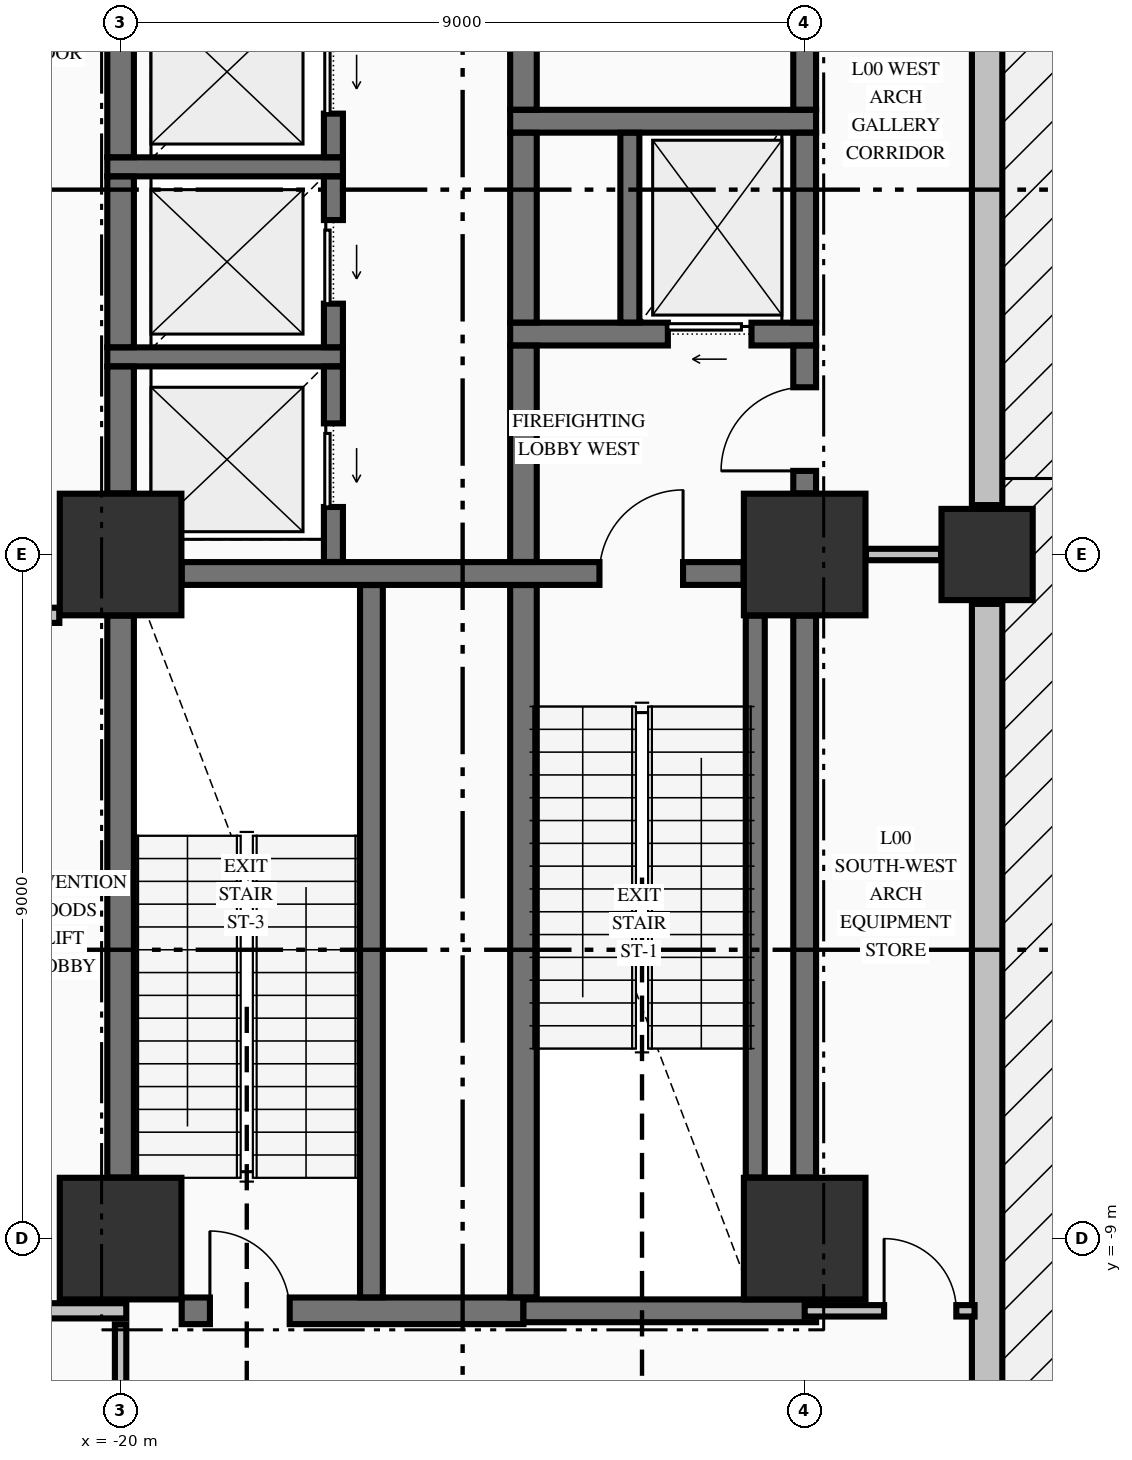
"""IFC4 building model, lengths in metres.
Left out: names, types, materials, properties, quantities, classifications, styles, units other than length and angle.
Written with IfcOpenShell. Run it as: python <this file> out.ifc"""

import sys

from ifc_helpers import new_model, si_unit, direction, frame, frame_2d, origin, origin_2d, place, context, subcontext, project, spatial, rectangle, extrude, element, fill, save


model = new_model("IFC4")
c1 = context("Model", 3, precision=1e-05, world=origin(), true_north=direction((0.0, 1.0)))
c2 = subcontext(c1, "Body", "Model", "MODEL_VIEW")
j1 = project(units=[si_unit("LENGTHUNIT", "METRE"), si_unit("PLANEANGLEUNIT", "RADIAN")], contexts=[c1])
p1 = place(None, origin())
s1 = spatial("IfcSite", under=j1, at=p1, CompositionType="ELEMENT")
p2 = place(p1, origin())
s2 = spatial("IfcBuilding", under=s1, at=p2, CompositionType="ELEMENT")
p3 = place(p2, origin())
s3 = spatial("IfcBuildingStorey", under=s2, at=p3, CompositionType="ELEMENT", Elevation=0.0)
for number, where, z_axis, x_axis in (
    (1, (-20.0, -9.0, 0.0), (0.0, 0.0, 1.0), (1.0, 0.0, 0.0)),
    (2, (-20.0, 0.0, 0.0), (0.0, 0.0, 1.0), (1.0, 0.0, 0.0)),
    (3, (-11.0, -9.0, 0.0), (0.0, 0.0, 1.0), (1.0, 0.0, 0.0)),
    (4, (-11.0, 0.0, 0.0), (0.0, 0.0, 1.0), (1.0, 0.0, 0.0)),
):
    element("IfcColumn", number, at=place(p3, frame(where, z_axis=z_axis, x_axis=x_axis)), inside=s3, PredefinedType="COLUMN", context=c2, shape_type="SweptSolid", body=[
        extrude(rectangle(XDim=1.6, YDim=1.6, at=origin_2d()), origin(), (0.0, 0.0, 1.0), 5.09),
    ])
p4 = place(p3, frame((-8.6, 0.0, 0.0), z_axis=(0.0, 0.0, 1.0), x_axis=(1.0, 0.0, 0.0)))
e5 = element("IfcColumn", 5, at=p4, inside=s3, PredefinedType="COLUMN", context=c2, shape_type="SweptSolid", body=[
    extrude(rectangle(XDim=1.2, YDim=1.2, at=origin_2d()), origin(), (0.0, 0.0, 1.0), 5.09),
])
p5 = place(p3, frame((-8.6, -25.35, 0.0), z_axis=(0.0, 0.0, 1.0), x_axis=(0.0, 1.0, 0.0)))
e6 = element("IfcWall", 6, at=p5, inside=s3, PredefinedType="STANDARD", context=c2, shape_type="SweptSolid", body=[
    extrude(rectangle(XDim=24.7, YDim=0.4, at=frame_2d((12.35, 0.0))), origin(), (0.0, 0.0, 1.0), 4.132),
])
p6 = place(p5, frame((10.5, 0.0, 0.0)))
e7 = element("IfcOpeningElement", 7, at=p6, cuts=e6, PredefinedType="OPENING", context=c2, shape_type="SweptSolid", body=[
    extrude(rectangle(XDim=2.4, YDim=2.6, at=frame_2d((1.2, 1.3))), frame((0.0, 0.21, 0.0), z_axis=(0.0, -1.0, 0.0), x_axis=(1.0, 0.0, 0.0)), (0.0, 0.0, 1.0), 0.42),
])
p7 = place(p3, frame((-8.6, 0.65, 0.0), z_axis=(0.0, 0.0, 1.0), x_axis=(0.0, 1.0, 0.0)))
e8 = element("IfcWall", 8, at=p7, inside=s3, PredefinedType="STANDARD", context=c2, shape_type="SweptSolid", body=[
    extrude(rectangle(XDim=14.7, YDim=0.4, at=frame_2d((7.35, 0.0))), origin(), (0.0, 0.0, 1.0), 4.132),
])
p8 = place(p3, frame((-19.196, -9.95, 0.0), z_axis=(0.0, 0.0, 1.0), x_axis=(1.0, 0.0, 0.0)))
e9 = element("IfcWall", 9, at=p8, inside=s3, PredefinedType="SHEAR", context=c2, shape_type="SweptSolid", body=[
    extrude(rectangle(XDim=4.496, YDim=0.35, at=frame_2d((2.248, 0.0))), origin(), (0.0, 0.0, 1.0), 5.09),
])
p9 = place(p8, frame((0.371, 0.0, 0.0)))
e10 = element("IfcOpeningElement", 10, at=p9, cuts=e9, PredefinedType="OPENING", context=c2, shape_type="SweptSolid", body=[
    extrude(rectangle(XDim=1.05, YDim=2.15, at=frame_2d((0.525, 1.075))), frame((0.0, 0.185, 0.0), z_axis=(0.0, -1.0, 0.0), x_axis=(1.0, 0.0, 0.0)), (0.0, 0.0, 1.0), 0.37),
])
p10 = place(p3, frame((-14.7, -9.95, 0.0), z_axis=(0.0, 0.0, 1.0), x_axis=(1.0, 0.0, 0.0)))
e11 = element("IfcWall", 11, at=p10, inside=s3, PredefinedType="SHEAR", context=c2, shape_type="SweptSolid", body=[
    extrude(rectangle(XDim=3.85, YDim=0.3, at=frame_2d((1.925, 0.0))), origin(), (0.0, 0.0, 1.0), 5.09),
])
p11 = place(p3, frame((-19.196, -0.25, 0.0), z_axis=(0.0, 0.0, 1.0), x_axis=(1.0, 0.0, 0.0)))
e12 = element("IfcWall", 12, at=p11, inside=s3, PredefinedType="SHEAR", context=c2, shape_type="SweptSolid", body=[
    extrude(rectangle(XDim=7.392, YDim=0.3, at=frame_2d((3.696, 0.0))), origin(), (0.0, 0.0, 1.0), 5.09),
])
p12 = place(p11, frame((5.496, 0.0, 0.0)))
e13 = element("IfcOpeningElement", 13, at=p12, cuts=e12, PredefinedType="OPENING", context=c2, shape_type="SweptSolid", body=[
    extrude(rectangle(XDim=1.1, YDim=2.15, at=frame_2d((0.55, 1.075))), frame((0.0, 0.16, 0.0), z_axis=(0.0, -1.0, 0.0), x_axis=(1.0, 0.0, 0.0)), (0.0, 0.0, 1.0), 0.32),
])
p13 = place(p3, frame((-20.175, 2.6, 0.0), z_axis=(0.0, 0.0, 1.0), x_axis=(1.0, 0.0, 0.0)))
e14 = element("IfcWall", 14, at=p13, inside=s3, PredefinedType="SOLIDWALL", context=c2, shape_type="SweptSolid", body=[
    extrude(rectangle(XDim=3.1, YDim=0.25, at=frame_2d((1.55, 0.0))), origin(), (0.0, 0.0, 1.0), 5.09),
])
p14 = place(p3, frame((-14.875, 2.9, 0.0), z_axis=(0.0, 0.0, 1.0), x_axis=(1.0, 0.0, 0.0)))
e15 = element("IfcWall", 15, at=p14, inside=s3, PredefinedType="SHEAR", context=c2, shape_type="SweptSolid", body=[
    extrude(rectangle(XDim=4.025, YDim=0.3, at=frame_2d((2.012, 0.0))), origin(), (0.0, 0.0, 1.0), 5.09),
])
p15 = place(p14, frame((2.075, 0.0, 0.0)))
e16 = element("IfcOpeningElement", 16, at=p15, cuts=e15, PredefinedType="OPENING", context=c2, shape_type="SweptSolid", body=[
    extrude(rectangle(XDim=1.1, YDim=2.2, at=frame_2d((0.55, 1.1))), frame((0.0, 0.16, 0.0), z_axis=(0.0, -1.0, 0.0), x_axis=(1.0, 0.0, 0.0)), (0.0, 0.0, 1.0), 0.32),
])
p16 = place(p3, frame((-20.175, 5.1, 0.0), z_axis=(0.0, 0.0, 1.0), x_axis=(1.0, 0.0, 0.0)))
e17 = element("IfcWall", 17, at=p16, inside=s3, PredefinedType="SOLIDWALL", context=c2, shape_type="SweptSolid", body=[
    extrude(rectangle(XDim=3.1, YDim=0.25, at=frame_2d((1.55, 0.0))), origin(), (0.0, 0.0, 1.0), 5.09),
])
p17 = place(p3, frame((-14.875, 5.7, 0.0), z_axis=(0.0, 0.0, 1.0), x_axis=(1.0, 0.0, 0.0)))
e18 = element("IfcWall", 18, at=p17, inside=s3, PredefinedType="SHEAR", context=c2, shape_type="SweptSolid", body=[
    extrude(rectangle(XDim=4.025, YDim=0.3, at=frame_2d((2.012, 0.0))), origin(), (0.0, 0.0, 1.0), 5.09),
])
p18 = place(p3, frame((-22.5, -9.95, 0.0), z_axis=(0.0, 0.0, 1.0), x_axis=(1.0, 0.0, 0.0)))
e19 = element("IfcWall", 19, at=p18, inside=s3, PredefinedType="PARTITIONING", context=c2, shape_type="SweptSolid", body=[
    extrude(rectangle(XDim=2.575, YDim=0.2, at=frame_2d((1.288, 0.0))), origin(), (0.0, 0.0, 1.0), 5.09),
])
p19 = place(p18, frame((0.48, 0.0, 0.0)))
e20 = element("IfcOpeningElement", 20, at=p19, cuts=e19, PredefinedType="OPENING", context=c2, shape_type="SweptSolid", body=[
    extrude(rectangle(XDim=1.0, YDim=2.15, at=frame_2d((0.5, 1.075))), frame((0.0, 0.11, 0.0), z_axis=(0.0, -1.0, 0.0), x_axis=(1.0, 0.0, 0.0)), (0.0, 0.0, 1.0), 0.22),
])
p20 = place(p3, frame((-11.0, -9.95, 0.0), z_axis=(0.0, 0.0, 1.0), x_axis=(1.0, 0.0, 0.0)))
e21 = element("IfcWall", 21, at=p20, inside=s3, PredefinedType="PARTITIONING", context=c2, shape_type="SweptSolid", body=[
    extrude(rectangle(XDim=2.235, YDim=0.15, at=frame_2d((1.118, 0.0))), origin(), (0.0, 0.0, 1.0), 5.09),
])
p21 = place(p20, frame((1.045, 0.0, 0.0)))
e22 = element("IfcOpeningElement", 22, at=p21, cuts=e21, PredefinedType="OPENING", context=c2, shape_type="SweptSolid", body=[
    extrude(rectangle(XDim=0.95, YDim=2.15, at=frame_2d((0.475, 1.075))), frame((0.0, 0.085, 0.0), z_axis=(0.0, -1.0, 0.0), x_axis=(1.0, 0.0, 0.0)), (0.0, 0.0, 1.0), 0.17),
])
p22 = place(p3, frame((-22.475, -0.8, 0.0), z_axis=(0.0, 0.0, 1.0), x_axis=(1.0, 0.0, 0.0)))
e23 = element("IfcWall", 23, at=p22, inside=s3, PredefinedType="PARTITIONING", context=c2, shape_type="SweptSolid", body=[
    extrude(rectangle(XDim=1.669, YDim=0.2, at=frame_2d((0.834, 0.0))), origin(), (0.0, 0.0, 1.0), 5.09),
])
p23 = place(p22, frame((0.425, 0.0, 0.0)))
e24 = element("IfcOpeningElement", 24, at=p23, cuts=e23, PredefinedType="OPENING", context=c2, shape_type="SweptSolid", body=[
    extrude(rectangle(XDim=1.0, YDim=2.15, at=frame_2d((0.5, 1.075))), frame((0.0, 0.11, 0.0), z_axis=(0.0, -1.0, 0.0), x_axis=(1.0, 0.0, 0.0)), (0.0, 0.0, 1.0), 0.22),
])
p24 = place(p3, frame((-10.194, 0.0, 0.0), z_axis=(0.0, 0.0, 1.0), x_axis=(1.0, 0.0, 0.0)))
e25 = element("IfcWall", 25, at=p24, inside=s3, PredefinedType="PARTITIONING", context=c2, shape_type="SweptSolid", body=[
    extrude(rectangle(XDim=0.988, YDim=0.15, at=frame_2d((0.494, 0.0))), origin(), (0.0, 0.0, 1.0), 4.132),
])
p25 = place(p3, frame((-20.0, -8.196, 0.0), z_axis=(0.0, 0.0, 1.0), x_axis=(0.0, 1.0, 0.0)))
e26 = element("IfcWall", 26, at=p25, inside=s3, PredefinedType="SHEAR", context=c2, shape_type="SweptSolid", body=[
    extrude(rectangle(XDim=7.392, YDim=0.35, at=frame_2d((3.696, 0.0))), origin(), (0.0, 0.0, 1.0), 5.09),
])
p26 = place(p3, frame((-20.0, 0.804, 0.0), z_axis=(0.0, 0.0, 1.0), x_axis=(0.0, 1.0, 0.0)))
e27 = element("IfcWall", 27, at=p26, inside=s3, PredefinedType="SHEAR", context=c2, shape_type="SweptSolid", body=[
    extrude(rectangle(XDim=1.669, YDim=0.35, at=frame_2d((0.834, 0.0))), origin(), (0.0, 0.0, 1.0), 5.09),
])
for number, where, z_axis, x_axis in (
    (28, (-20.0, 2.727, 0.0), (0.0, 0.0, 1.0), (0.0, 1.0, 0.0)),
    (29, (-20.0, 5.227, 0.0), (0.0, 0.0, 1.0), (0.0, 1.0, 0.0)),
):
    element("IfcWall", number, at=place(p3, frame(where, z_axis=z_axis, x_axis=x_axis)), inside=s3, PredefinedType="SHEAR", context=c2, shape_type="SweptSolid", body=[
        extrude(rectangle(XDim=2.246, YDim=0.35, at=frame_2d((1.123, 0.0))), origin(), (0.0, 0.0, 1.0), 5.09),
    ])
p27 = place(p3, frame((-17.2, -0.098, 0.0), z_axis=(0.0, 0.0, 1.0), x_axis=(0.0, 1.0, 0.0)))
e30 = element("IfcWall", 30, at=p27, inside=s3, PredefinedType="SOLIDWALL", context=c2, shape_type="SweptSolid", body=[
    extrude(rectangle(XDim=2.571, YDim=0.25, at=frame_2d((1.285, 0.0))), origin(), (0.0, 0.0, 1.0), 5.09),
])
p28 = place(p27, frame((0.723, 0.0, 0.0)))
e31 = element("IfcOpeningElement", 31, at=p28, cuts=e30, PredefinedType="OPENING", context=c2, shape_type="SweptSolid", body=[
    extrude(rectangle(XDim=1.1, YDim=2.2, at=frame_2d((0.55, 1.1))), frame((0.0, 0.135, 0.0), z_axis=(0.0, -1.0, 0.0), x_axis=(1.0, 0.0, 0.0)), (0.0, 0.0, 1.0), 0.27),
])
p29 = place(p3, frame((-17.2, 2.727, 0.0), z_axis=(0.0, 0.0, 1.0), x_axis=(0.0, 1.0, 0.0)))
e32 = element("IfcWall", 32, at=p29, inside=s3, PredefinedType="SOLIDWALL", context=c2, shape_type="SweptSolid", body=[
    extrude(rectangle(XDim=2.246, YDim=0.25, at=frame_2d((1.123, 0.0))), origin(), (0.0, 0.0, 1.0), 5.09),
])
p30 = place(p29, frame((0.573, 0.0, 0.0)))
e33 = element("IfcOpeningElement", 33, at=p30, cuts=e32, PredefinedType="OPENING", context=c2, shape_type="SweptSolid", body=[
    extrude(rectangle(XDim=1.1, YDim=2.2, at=frame_2d((0.55, 1.1))), frame((0.0, 0.135, 0.0), z_axis=(0.0, -1.0, 0.0), x_axis=(1.0, 0.0, 0.0)), (0.0, 0.0, 1.0), 0.27),
])
p31 = place(p3, frame((-17.2, 5.227, 0.0), z_axis=(0.0, 0.0, 1.0), x_axis=(0.0, 1.0, 0.0)))
e34 = element("IfcWall", 34, at=p31, inside=s3, PredefinedType="SOLIDWALL", context=c2, shape_type="SweptSolid", body=[
    extrude(rectangle(XDim=2.246, YDim=0.25, at=frame_2d((1.123, 0.0))), origin(), (0.0, 0.0, 1.0), 5.09),
])
p32 = place(p31, frame((0.573, 0.0, 0.0)))
e35 = element("IfcOpeningElement", 35, at=p32, cuts=e34, PredefinedType="OPENING", context=c2, shape_type="SweptSolid", body=[
    extrude(rectangle(XDim=1.1, YDim=2.2, at=frame_2d((0.55, 1.1))), frame((0.0, 0.135, 0.0), z_axis=(0.0, -1.0, 0.0), x_axis=(1.0, 0.0, 0.0)), (0.0, 0.0, 1.0), 0.27),
])
p33 = place(p3, frame((-16.7, -9.773, 0.0), z_axis=(0.0, 0.0, 1.0), x_axis=(0.0, 1.0, 0.0)))
e36 = element("IfcWall", 36, at=p33, inside=s3, PredefinedType="SHEAR", context=c2, shape_type="SweptSolid", body=[
    extrude(rectangle(XDim=9.371, YDim=0.3, at=frame_2d((4.686, 0.0))), origin(), (0.0, 0.0, 1.0), 5.09),
])
p34 = place(p3, frame((-14.7, -9.773, 0.0), z_axis=(0.0, 0.0, 1.0), x_axis=(0.0, 1.0, 0.0)))
e37 = element("IfcWall", 37, at=p34, inside=s3, PredefinedType="SHEAR", context=c2, shape_type="SweptSolid", body=[
    extrude(rectangle(XDim=9.371, YDim=0.35, at=frame_2d((4.686, 0.0))), origin(), (0.0, 0.0, 1.0), 5.09),
])
p35 = place(p3, frame((-14.7, -0.098, 0.0), z_axis=(0.0, 0.0, 1.0), x_axis=(0.0, 1.0, 0.0)))
e38 = element("IfcWall", 38, at=p35, inside=s3, PredefinedType="SHEAR", context=c2, shape_type="SweptSolid", body=[
    extrude(rectangle(XDim=2.846, YDim=0.35, at=frame_2d((1.423, 0.0))), origin(), (0.0, 0.0, 1.0), 5.09),
])
p36 = place(p3, frame((-14.7, 3.052, 0.0), z_axis=(0.0, 0.0, 1.0), x_axis=(0.0, 1.0, 0.0)))
e39 = element("IfcWall", 39, at=p36, inside=s3, PredefinedType="SHEAR", context=c2, shape_type="SweptSolid", body=[
    extrude(rectangle(XDim=2.496, YDim=0.35, at=frame_2d((1.248, 0.0))), origin(), (0.0, 0.0, 1.0), 5.09),
])
p37 = place(p3, frame((-14.7, 5.852, 0.0), z_axis=(0.0, 0.0, 1.0), x_axis=(0.0, 1.0, 0.0)))
e40 = element("IfcWall", 40, at=p37, inside=s3, PredefinedType="SHEAR", context=c2, shape_type="SweptSolid", body=[
    extrude(rectangle(XDim=4.471, YDim=0.35, at=frame_2d((2.235, 0.0))), origin(), (0.0, 0.0, 1.0), 5.09),
])
p38 = place(p3, frame((-13.3, 3.052, 0.0), z_axis=(0.0, 0.0, 1.0), x_axis=(0.0, 1.0, 0.0)))
e41 = element("IfcWall", 41, at=p38, inside=s3, PredefinedType="SOLIDWALL", context=c2, shape_type="SweptSolid", body=[
    extrude(rectangle(XDim=2.496, YDim=0.25, at=frame_2d((1.248, 0.0))), origin(), (0.0, 0.0, 1.0), 5.09),
])
p39 = place(p3, frame((-11.65, -8.196, 0.0), z_axis=(0.0, 0.0, 1.0), x_axis=(0.0, 1.0, 0.0)))
e42 = element("IfcWall", 42, at=p39, inside=s3, PredefinedType="SOLIDWALL", context=c2, shape_type="SweptSolid", body=[
    extrude(rectangle(XDim=7.392, YDim=0.25, at=frame_2d((3.696, 0.0))), origin(), (0.0, 0.0, 1.0), 5.09),
])
p40 = place(p3, frame((-11.0, -8.196, 0.0), z_axis=(0.0, 0.0, 1.0), x_axis=(0.0, 1.0, 0.0)))
e43 = element("IfcWall", 43, at=p40, inside=s3, PredefinedType="SHEAR", context=c2, shape_type="SweptSolid", body=[
    extrude(rectangle(XDim=7.392, YDim=0.3, at=frame_2d((3.696, 0.0))), origin(), (0.0, 0.0, 1.0), 5.09),
])
p41 = place(p3, frame((-11.0, 0.804, 0.0), z_axis=(0.0, 0.0, 1.0), x_axis=(0.0, 1.0, 0.0)))
e44 = element("IfcWall", 44, at=p41, inside=s3, PredefinedType="SHEAR", context=c2, shape_type="SweptSolid", body=[
    extrude(rectangle(XDim=1.944, YDim=0.3, at=frame_2d((0.972, 0.0))), origin(), (0.0, 0.0, 1.0), 5.09),
])
p42 = place(p41, frame((0.296, 0.0, 0.0)))
e45 = element("IfcOpeningElement", 45, at=p42, cuts=e44, PredefinedType="OPENING", context=c2, shape_type="SweptSolid", body=[
    extrude(rectangle(XDim=1.1, YDim=2.15, at=frame_2d((0.55, 1.075))), frame((0.0, 0.16, 0.0), z_axis=(0.0, -1.0, 0.0), x_axis=(1.0, 0.0, 0.0)), (0.0, 0.0, 1.0), 0.32),
])
p43 = place(p3, frame((-11.0, 3.052, 0.0), z_axis=(0.0, 0.0, 1.0), x_axis=(0.0, 1.0, 0.0)))
e46 = element("IfcWall", 46, at=p43, inside=s3, PredefinedType="SHEAR", context=c2, shape_type="SweptSolid", body=[
    extrude(rectangle(XDim=2.496, YDim=0.3, at=frame_2d((1.248, 0.0))), origin(), (0.0, 0.0, 1.0), 5.09),
])
p44 = place(p3, frame((-11.0, 5.852, 0.0), z_axis=(0.0, 0.0, 1.0), x_axis=(0.0, 1.0, 0.0)))
e47 = element("IfcWall", 47, at=p44, inside=s3, PredefinedType="SHEAR", context=c2, shape_type="SweptSolid", body=[
    extrude(rectangle(XDim=2.344, YDim=0.3, at=frame_2d((1.172, 0.0))), origin(), (0.0, 0.0, 1.0), 5.09),
])
p45 = place(p3, frame((-20.0, -15.194, 0.0), z_axis=(0.0, 0.0, 1.0), x_axis=(0.0, 1.0, 0.0)))
e48 = element("IfcWall", 48, at=p45, inside=s3, PredefinedType="PARTITIONING", context=c2, shape_type="SweptSolid", body=[
    extrude(rectangle(XDim=5.066, YDim=0.15, at=frame_2d((2.533, 0.0))), origin(), (0.0, 0.0, 1.0), 5.09),
])
p46 = place(p45, frame((1.569, 0.0, 0.0)))
e49 = element("IfcOpeningElement", 49, at=p46, cuts=e48, PredefinedType="OPENING", context=c2, shape_type="SweptSolid", body=[
    extrude(rectangle(XDim=1.05, YDim=2.15, at=frame_2d((0.525, 1.075))), frame((0.0, 0.085, 0.0), z_axis=(0.0, -1.0, 0.0), x_axis=(1.0, 0.0, 0.0)), (0.0, 0.0, 1.0), 0.17),
])
p47 = place(p12, origin())
e50 = element("IfcDoor", 50, at=p47, inside=s3, OperationType="SINGLE_SWING_RIGHT", PredefinedType="DOOR", context=c2, shape_type="SweptSolid", body=[
    extrude(rectangle(XDim=1.1, YDim=2.15, at=frame_2d((0.55, 1.075))), frame((0.0, 0.025, 0.0), z_axis=(0.0, -1.0, 0.0), x_axis=(1.0, 0.0, 0.0)), (0.0, 0.0, 1.0), 0.05),
])
fill(e13, e50)
p48 = place(p42, origin())
e51 = element("IfcDoor", 51, at=p48, inside=s3, OperationType="SINGLE_SWING_LEFT", PredefinedType="DOOR", context=c2, shape_type="SweptSolid", body=[
    extrude(rectangle(XDim=1.1, YDim=2.15, at=frame_2d((0.55, 1.075))), frame((0.0, 0.025, 0.0), z_axis=(0.0, -1.0, 0.0), x_axis=(1.0, 0.0, 0.0)), (0.0, 0.0, 1.0), 0.05),
])
fill(e45, e51)
p49 = place(p15, origin())
e52 = element("IfcDoor", 52, at=p49, inside=s3, OperationType="SLIDING_TO_LEFT", PredefinedType="DOOR", context=c2, shape_type="SweptSolid", body=[
    extrude(rectangle(XDim=1.1, YDim=2.2, at=frame_2d((0.55, 1.1))), frame((0.0, 0.025, 0.0), z_axis=(0.0, -1.0, 0.0), x_axis=(1.0, 0.0, 0.0)), (0.0, 0.0, 1.0), 0.05),
])
fill(e16, e52)
p50 = place(p9, origin())
e53 = element("IfcDoor", 53, at=p50, inside=s3, OperationType="SINGLE_SWING_LEFT", PredefinedType="DOOR", context=c2, shape_type="SweptSolid", body=[
    extrude(rectangle(XDim=1.05, YDim=2.15, at=frame_2d((0.525, 1.075))), frame((0.0, 0.025, 0.0), z_axis=(0.0, -1.0, 0.0), x_axis=(1.0, 0.0, 0.0)), (0.0, 0.0, 1.0), 0.05),
])
fill(e10, e53)
p51 = place(p28, origin())
e54 = element("IfcDoor", 54, at=p51, inside=s3, OperationType="SLIDING_TO_LEFT", PredefinedType="DOOR", context=c2, shape_type="SweptSolid", body=[
    extrude(rectangle(XDim=1.1, YDim=2.2, at=frame_2d((0.55, 1.1))), frame((0.0, 0.025, 0.0), z_axis=(0.0, -1.0, 0.0), x_axis=(1.0, 0.0, 0.0)), (0.0, 0.0, 1.0), 0.05),
])
fill(e31, e54)
p52 = place(p30, origin())
e55 = element("IfcDoor", 55, at=p52, inside=s3, OperationType="SLIDING_TO_LEFT", PredefinedType="DOOR", context=c2, shape_type="SweptSolid", body=[
    extrude(rectangle(XDim=1.1, YDim=2.2, at=frame_2d((0.55, 1.1))), frame((0.0, 0.025, 0.0), z_axis=(0.0, -1.0, 0.0), x_axis=(1.0, 0.0, 0.0)), (0.0, 0.0, 1.0), 0.05),
])
fill(e33, e55)
p53 = place(p32, origin())
e56 = element("IfcDoor", 56, at=p53, inside=s3, OperationType="SLIDING_TO_LEFT", PredefinedType="DOOR", context=c2, shape_type="SweptSolid", body=[
    extrude(rectangle(XDim=1.1, YDim=2.2, at=frame_2d((0.55, 1.1))), frame((0.0, 0.025, 0.0), z_axis=(0.0, -1.0, 0.0), x_axis=(1.0, 0.0, 0.0)), (0.0, 0.0, 1.0), 0.05),
])
fill(e35, e56)
p54 = place(p21, origin())
e57 = element("IfcDoor", 57, at=p54, inside=s3, OperationType="SINGLE_SWING_LEFT", PredefinedType="DOOR", context=c2, shape_type="SweptSolid", body=[
    extrude(rectangle(XDim=0.95, YDim=2.15, at=frame_2d((0.475, 1.075))), frame((0.0, 0.025, 0.0), z_axis=(0.0, -1.0, 0.0), x_axis=(1.0, 0.0, 0.0)), (0.0, 0.0, 1.0), 0.05),
])
fill(e22, e57)
save(model, sys.argv[1])
